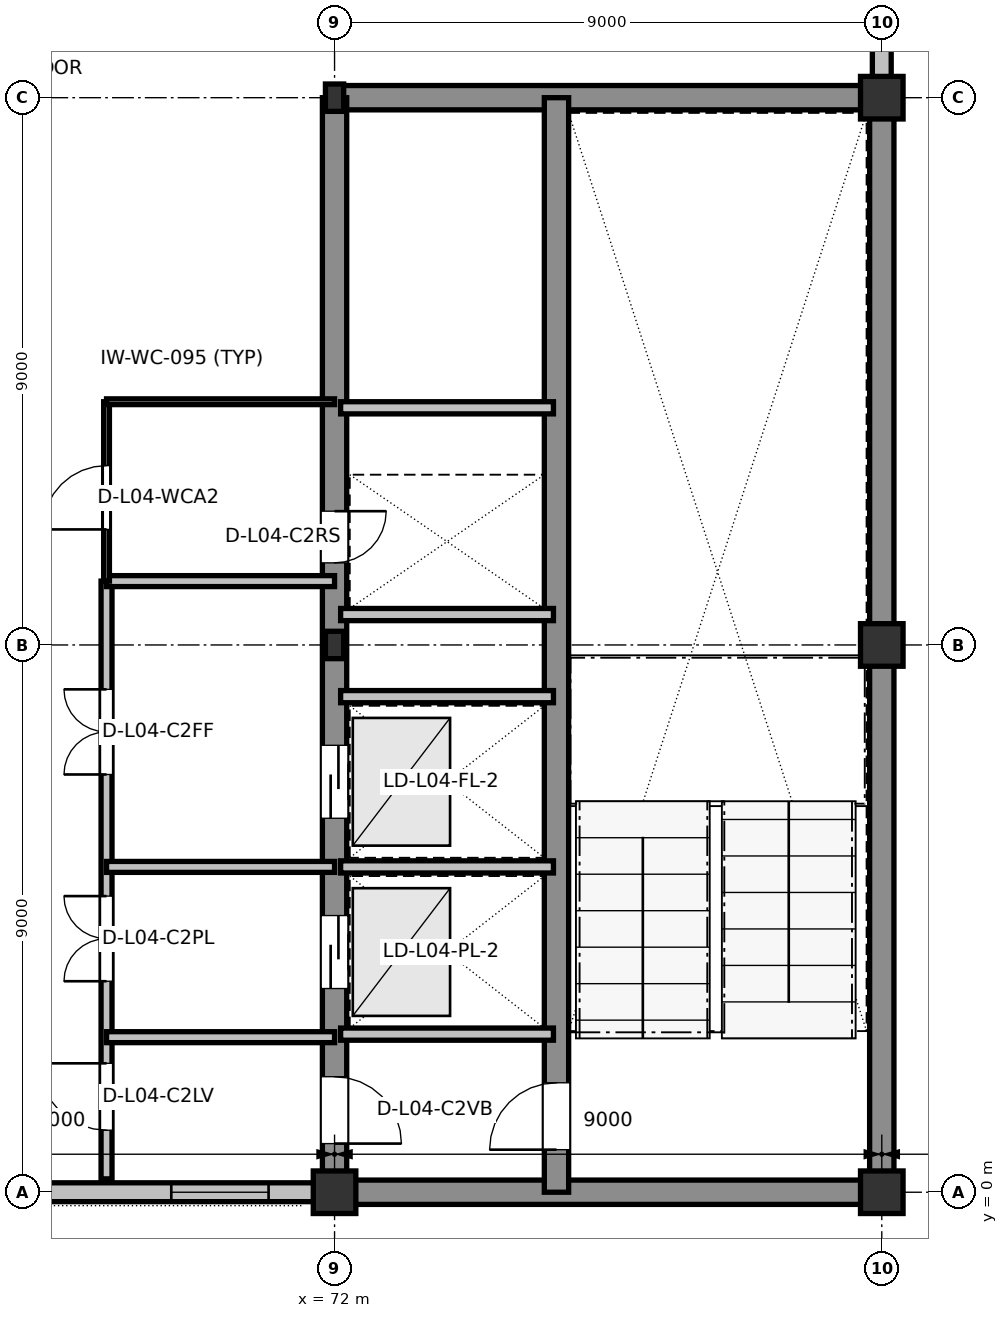
"""IFC4 building model, lengths in metres.
Left out: names, types, materials, properties, quantities, classifications, styles, units other than length and angle.
Written with IfcOpenShell. Run it as: python <this file> out.ifc"""

import sys

from ifc_helpers import new_model, si_unit, direction, frame, frame_2d, origin, origin_2d, place, context, subcontext, project, spatial, rectangle, i_section, extrude, element, fill, save


model = new_model("IFC4")
c1 = context("Model", 3, precision=1e-05, world=origin(), true_north=direction((0.0, 1.0)))
c2 = subcontext(c1, "Body", "Model", "MODEL_VIEW")
j1 = project(units=[si_unit("LENGTHUNIT", "METRE"), si_unit("PLANEANGLEUNIT", "RADIAN")], contexts=[c1])
p1 = place(None, origin())
s1 = spatial("IfcSite", under=j1, at=p1, CompositionType="ELEMENT")
p2 = place(p1, origin())
s2 = spatial("IfcBuilding", under=s1, at=p2, CompositionType="ELEMENT")
p3 = place(p2, frame((0.0, 0.0, 19.2)))
s3 = spatial("IfcBuildingStorey", under=s2, at=p3, CompositionType="ELEMENT", Elevation=19.2)
p4 = place(p3, frame((72.0, 0.0, 0.0), z_axis=(0.0, 0.0, 1.0), x_axis=(1.0, 0.0, 0.0)))
e1 = element("IfcColumn", 1, at=p4, inside=s3, PredefinedType="COLUMN", context=c2, shape_type="SweptSolid", body=[
    extrude(rectangle(XDim=0.7, YDim=0.7, at=origin_2d()), origin(), (0.0, 0.0, 1.0), 4.2),
])
for number, where, z_axis, x_axis in (
    (2, (72.0, 9.0, 0.0), (0.0, 0.0, 1.0), (1.0, 0.0, 0.0)),
    (3, (72.0, 18.0, 0.0), (0.0, 0.0, 1.0), (1.0, 0.0, 0.0)),
):
    element("IfcColumn", number, at=place(p3, frame(where, z_axis=z_axis, x_axis=x_axis)), inside=s3, PredefinedType="COLUMN", context=c2, shape_type="SweptSolid", body=[
        extrude(i_section(OverallWidth=0.3, OverallDepth=0.45, WebThickness=0.014, FlangeThickness=0.026, at=origin_2d()), origin(), (0.0, 0.0, 1.0), 4.2),
    ])
for number, where, z_axis, x_axis in (
    (4, (81.0, 0.0, 0.0), (0.0, 0.0, 1.0), (1.0, 0.0, 0.0)),
    (5, (81.0, 9.0, 0.0), (0.0, 0.0, 1.0), (1.0, 0.0, 0.0)),
    (6, (81.0, 18.0, 0.0), (0.0, 0.0, 1.0), (1.0, 0.0, 0.0)),
):
    element("IfcColumn", number, at=place(p3, frame(where, z_axis=z_axis, x_axis=x_axis)), inside=s3, PredefinedType="COLUMN", context=c2, shape_type="SweptSolid", body=[
        extrude(rectangle(XDim=0.7, YDim=0.7, at=origin_2d()), origin(), (0.0, 0.0, 1.0), 4.2),
    ])
p5 = place(p3, frame((63.335, 0.0, 0.0), z_axis=(0.0, 0.0, 1.0), x_axis=(1.0, 0.0, 0.0)))
e7 = element("IfcWall", 7, at=p5, inside=s3, PredefinedType="STANDARD", context=c2, shape_type="SweptSolid", body=[
    extrude(rectangle(XDim=8.33, YDim=0.31, at=frame_2d((4.165, 0.0))), origin(), (0.0, 0.0, 1.0), 3.635),
])
p6 = place(p5, frame((5.98, 0.0, 0.9)))
e8 = element("IfcOpeningElement", 8, at=p6, cuts=e7, PredefinedType="OPENING", context=c2, shape_type="SweptSolid", body=[
    extrude(rectangle(XDim=1.6, YDim=2.0, at=frame_2d((0.8, 1.0))), frame((0.0, 0.165, 0.0), z_axis=(0.0, -1.0, 0.0), x_axis=(1.0, 0.0, 0.0)), (0.0, 0.0, 1.0), 0.33),
])
p7 = place(p3, frame((81.0, 18.335, 0.0), z_axis=(0.0, 0.0, 1.0), x_axis=(0.0, 1.0, 0.0)))
e9 = element("IfcWall", 9, at=p7, inside=s3, PredefinedType="STANDARD", context=c2, shape_type="SweptSolid", body=[
    extrude(rectangle(XDim=2.74, YDim=0.31, at=frame_2d((1.37, 0.0))), origin(), (0.0, 0.0, 1.0), 3.94),
])
p8 = place(p3, frame((72.0, 0.0, 0.0), z_axis=(0.0, 0.0, 1.0), x_axis=(1.0, 0.0, 0.0)))
e10 = element("IfcWall", 10, at=p8, inside=s3, PredefinedType="SHEAR", context=c2, shape_type="SweptSolid", body=[
    extrude(rectangle(XDim=9.0, YDim=0.4, at=frame_2d((4.5, 0.0))), origin(), (0.0, 0.0, 1.0), 3.96),
])
p9 = place(p3, frame((81.0, 0.0, 0.0), z_axis=(0.0, 0.0, 1.0), x_axis=(0.0, 1.0, 0.0)))
e11 = element("IfcWall", 11, at=p9, inside=s3, PredefinedType="SHEAR", context=c2, shape_type="SweptSolid", body=[
    extrude(rectangle(XDim=18.0, YDim=0.4, at=frame_2d((9.0, 0.0))), origin(), (0.0, 0.0, 1.0), 3.96),
])
p10 = place(p3, frame((81.0, 18.0, 0.0), z_axis=(0.0, 0.0, 1.0), x_axis=(-1.0, 0.0, 0.0)))
e12 = element("IfcWall", 12, at=p10, inside=s3, PredefinedType="SHEAR", context=c2, shape_type="SweptSolid", body=[
    extrude(rectangle(XDim=9.0, YDim=0.4, at=frame_2d((4.5, 0.0))), origin(), (0.0, 0.0, 1.0), 3.96),
])
p11 = place(p3, frame((72.0, 18.0, 0.0), z_axis=(0.0, 0.0, 1.0), x_axis=(0.0, -1.0, 0.0)))
e13 = element("IfcWall", 13, at=p11, inside=s3, PredefinedType="SHEAR", context=c2, shape_type="SweptSolid", body=[
    extrude(rectangle(XDim=18.0, YDim=0.4, at=frame_2d((9.0, 0.0))), origin(), (0.0, 0.0, 1.0), 3.96),
])
p12 = place(p11, frame((16.1, 0.0, 0.0)))
e14 = element("IfcOpeningElement", 14, at=p12, cuts=e13, PredefinedType="OPENING", context=c2, shape_type="SweptSolid", body=[
    extrude(rectangle(XDim=1.1, YDim=2.16, at=frame_2d((0.55, 1.08))), frame((0.0, 0.21, 0.0), z_axis=(0.0, -1.0, 0.0), x_axis=(1.0, 0.0, 0.0)), (0.0, 0.0, 1.0), 0.42),
])
p13 = place(p11, frame((13.45, 0.0, 0.0)))
e15 = element("IfcOpeningElement", 15, at=p13, cuts=e13, PredefinedType="OPENING", context=c2, shape_type="SweptSolid", body=[
    extrude(rectangle(XDim=1.2, YDim=2.2, at=frame_2d((0.6, 1.1))), frame((0.0, 0.21, 0.0), z_axis=(0.0, -1.0, 0.0), x_axis=(1.0, 0.0, 0.0)), (0.0, 0.0, 1.0), 0.42),
])
p14 = place(p11, frame((10.65, 0.0, 0.0)))
e16 = element("IfcOpeningElement", 16, at=p14, cuts=e13, PredefinedType="OPENING", context=c2, shape_type="SweptSolid", body=[
    extrude(rectangle(XDim=1.2, YDim=2.2, at=frame_2d((0.6, 1.1))), frame((0.0, 0.21, 0.0), z_axis=(0.0, -1.0, 0.0), x_axis=(1.0, 0.0, 0.0)), (0.0, 0.0, 1.0), 0.42),
])
p15 = place(p11, frame((6.8, 0.0, 0.0)))
e17 = element("IfcOpeningElement", 17, at=p15, cuts=e13, PredefinedType="OPENING", context=c2, shape_type="SweptSolid", body=[
    extrude(rectangle(XDim=0.85, YDim=2.1, at=frame_2d((0.425, 1.05))), frame((0.0, 0.21, 0.0), z_axis=(0.0, -1.0, 0.0), x_axis=(1.0, 0.0, 0.0)), (0.0, 0.0, 1.0), 0.42),
])
p16 = place(p3, frame((75.65, 0.0, 0.0), z_axis=(0.0, 0.0, 1.0), x_axis=(0.0, 1.0, 0.0)))
e18 = element("IfcWall", 18, at=p16, inside=s3, PredefinedType="SHEAR", context=c2, shape_type="SweptSolid", body=[
    extrude(rectangle(XDim=18.0, YDim=0.4, at=frame_2d((9.0, 0.0))), origin(), (0.0, 0.0, 1.0), 3.96),
])
p17 = place(p16, frame((0.7, 0.0, 0.0)))
e19 = element("IfcOpeningElement", 19, at=p17, cuts=e18, PredefinedType="OPENING", context=c2, shape_type="SweptSolid", body=[
    extrude(rectangle(XDim=1.1, YDim=2.16, at=frame_2d((0.55, 1.08))), frame((0.0, 0.21, 0.0), z_axis=(0.0, -1.0, 0.0), x_axis=(1.0, 0.0, 0.0)), (0.0, 0.0, 1.0), 0.42),
])
for number, where, z_axis, x_axis in (
    (20, (72.1, 2.6, 0.0), (0.0, 0.0, 1.0), (1.0, 0.0, 0.0)),
    (21, (72.1, 5.35, 0.0), (0.0, 0.0, 1.0), (1.0, 0.0, 0.0)),
    (22, (72.1, 8.15, 0.0), (0.0, 0.0, 1.0), (1.0, 0.0, 0.0)),
    (23, (72.1, 9.5, 0.0), (0.0, 0.0, 1.0), (1.0, 0.0, 0.0)),
    (24, (72.1, 12.9, 0.0), (0.0, 0.0, 1.0), (1.0, 0.0, 0.0)),
):
    element("IfcWall", number, at=place(p3, frame(where, z_axis=z_axis, x_axis=x_axis)), inside=s3, PredefinedType="PARTITIONING", context=c2, shape_type="SweptSolid", body=[
        extrude(rectangle(XDim=3.5, YDim=0.2, at=frame_2d((1.75, 0.0))), origin(), (0.0, 0.0, 1.0), 3.96),
    ])
p18 = place(p3, frame((68.25, 0.22, 0.0), z_axis=(0.0, 0.0, 1.0), x_axis=(0.0, 1.0, 0.0)))
e25 = element("IfcWall", 25, at=p18, inside=s3, PredefinedType="PARTITIONING", context=c2, shape_type="SweptSolid", body=[
    extrude(rectangle(XDim=9.83, YDim=0.18, at=frame_2d((4.915, 0.0))), origin(), (0.0, 0.0, 1.0), 3.96),
])
p19 = place(p18, frame((0.8, 0.0, 0.0)))
e26 = element("IfcOpeningElement", 26, at=p19, cuts=e25, PredefinedType="OPENING", context=c2, shape_type="SweptSolid", body=[
    extrude(rectangle(XDim=1.1, YDim=2.16, at=frame_2d((0.55, 1.08))), frame((0.0, 0.1, 0.0), z_axis=(0.0, -1.0, 0.0), x_axis=(1.0, 0.0, 0.0)), (0.0, 0.0, 1.0), 0.2),
])
p20 = place(p18, frame((3.25, 0.0, 0.0)))
e27 = element("IfcOpeningElement", 27, at=p20, cuts=e25, PredefinedType="OPENING", context=c2, shape_type="SweptSolid", body=[
    extrude(rectangle(XDim=1.4, YDim=2.2, at=frame_2d((0.7, 1.1))), frame((0.0, 0.1, 0.0), z_axis=(0.0, -1.0, 0.0), x_axis=(1.0, 0.0, 0.0)), (0.0, 0.0, 1.0), 0.2),
])
p21 = place(p18, frame((6.65, 0.0, 0.0)))
e28 = element("IfcOpeningElement", 28, at=p21, cuts=e25, PredefinedType="OPENING", context=c2, shape_type="SweptSolid", body=[
    extrude(rectangle(XDim=1.4, YDim=2.2, at=frame_2d((0.7, 1.1))), frame((0.0, 0.1, 0.0), z_axis=(0.0, -1.0, 0.0), x_axis=(1.0, 0.0, 0.0)), (0.0, 0.0, 1.0), 0.2),
])
for number, where, z_axis, x_axis in (
    (29, (68.25, 2.55, 0.0), (0.0, 0.0, 1.0), (1.0, 0.0, 0.0)),
    (30, (68.25, 5.35, 0.0), (0.0, 0.0, 1.0), (1.0, 0.0, 0.0)),
    (31, (68.25, 10.05, 0.0), (0.0, 0.0, 1.0), (1.0, 0.0, 0.0)),
):
    element("IfcWall", number, at=place(p3, frame(where, z_axis=z_axis, x_axis=x_axis)), inside=s3, PredefinedType="PARTITIONING", context=c2, shape_type="SweptSolid", body=[
        extrude(rectangle(XDim=3.75, YDim=0.18, at=frame_2d((1.875, 0.0))), origin(), (0.0, 0.0, 1.0), 3.96),
    ])
p22 = place(p3, frame((68.25, 10.05, 0.0), z_axis=(0.0, 0.0, 1.0), x_axis=(0.0, 1.0, 0.0)))
e32 = element("IfcWall", 32, at=p22, inside=s3, PredefinedType="PARTITIONING", context=c2, shape_type="SweptSolid", body=[
    extrude(rectangle(XDim=2.95, YDim=0.095, at=frame_2d((1.475, 0.0))), origin(), (0.0, 0.0, 1.0), 3.96),
])
p23 = place(p22, frame((0.85, 0.0, 0.0)))
e33 = element("IfcOpeningElement", 33, at=p23, cuts=e32, PredefinedType="OPENING", context=c2, shape_type="SweptSolid", body=[
    extrude(rectangle(XDim=1.05, YDim=2.13, at=frame_2d((0.525, 1.065))), frame((0.0, 0.057, 0.0), z_axis=(0.0, -1.0, 0.0), x_axis=(1.0, 0.0, 0.0)), (0.0, 0.0, 1.0), 0.115),
])
p24 = place(p3, frame((68.25, 13.0, 0.0), z_axis=(0.0, 0.0, 1.0), x_axis=(1.0, 0.0, 0.0)))
e34 = element("IfcWall", 34, at=p24, inside=s3, PredefinedType="PARTITIONING", context=c2, shape_type="SweptSolid", body=[
    extrude(rectangle(XDim=3.75, YDim=0.095, at=frame_2d((1.875, 0.0))), origin(), (0.0, 0.0, 1.0), 3.96),
])
p25 = place(p6, origin())
e35 = element("IfcWindow", 35, at=p25, inside=s3, PartitioningType="SINGLE_PANEL", PredefinedType="WINDOW", context=c2, shape_type="SweptSolid", body=[
    extrude(rectangle(XDim=1.6, YDim=2.0, at=frame_2d((0.8, 1.0))), frame((0.0, 0.03, 0.0), z_axis=(0.0, -1.0, 0.0), x_axis=(1.0, 0.0, 0.0)), (0.0, 0.0, 1.0), 0.06),
])
fill(e8, e35)
p26 = place(p17, origin())
e36 = element("IfcDoor", 36, at=p26, inside=s3, OperationType="SINGLE_SWING_LEFT", PredefinedType="DOOR", context=c2, shape_type="SweptSolid", body=[
    extrude(rectangle(XDim=1.1, YDim=2.16, at=frame_2d((0.55, 1.08))), frame((0.0, 0.025, 0.0), z_axis=(0.0, -1.0, 0.0), x_axis=(1.0, 0.0, 0.0)), (0.0, 0.0, 1.0), 0.05),
])
fill(e19, e36)
p27 = place(p12, origin())
e37 = element("IfcDoor", 37, at=p27, inside=s3, OperationType="SINGLE_SWING_RIGHT", PredefinedType="DOOR", context=c2, shape_type="SweptSolid", body=[
    extrude(rectangle(XDim=1.1, YDim=2.16, at=frame_2d((0.55, 1.08))), frame((0.0, 0.025, 0.0), z_axis=(0.0, -1.0, 0.0), x_axis=(1.0, 0.0, 0.0)), (0.0, 0.0, 1.0), 0.05),
])
fill(e14, e37)
p28 = place(p13, origin())
e38 = element("IfcDoor", 38, at=p28, inside=s3, OperationType="SLIDING_TO_LEFT", PredefinedType="DOOR", context=c2, shape_type="SweptSolid", body=[
    extrude(rectangle(XDim=1.2, YDim=2.2, at=frame_2d((0.6, 1.1))), frame((0.0, 0.025, 0.0), z_axis=(0.0, -1.0, 0.0), x_axis=(1.0, 0.0, 0.0)), (0.0, 0.0, 1.0), 0.05),
])
fill(e15, e38)
p29 = place(p14, origin())
e39 = element("IfcDoor", 39, at=p29, inside=s3, OperationType="SLIDING_TO_LEFT", PredefinedType="DOOR", context=c2, shape_type="SweptSolid", body=[
    extrude(rectangle(XDim=1.2, YDim=2.2, at=frame_2d((0.6, 1.1))), frame((0.0, 0.025, 0.0), z_axis=(0.0, -1.0, 0.0), x_axis=(1.0, 0.0, 0.0)), (0.0, 0.0, 1.0), 0.05),
])
fill(e16, e39)
p30 = place(p15, origin())
e40 = element("IfcDoor", 40, at=p30, inside=s3, OperationType="SINGLE_SWING_LEFT", PredefinedType="DOOR", context=c2, shape_type="SweptSolid", body=[
    extrude(rectangle(XDim=0.85, YDim=2.1, at=frame_2d((0.425, 1.05))), frame((0.0, 0.025, 0.0), z_axis=(0.0, -1.0, 0.0), x_axis=(1.0, 0.0, 0.0)), (0.0, 0.0, 1.0), 0.05),
])
fill(e17, e40)
p31 = place(p19, origin())
e41 = element("IfcDoor", 41, at=p31, inside=s3, OperationType="SINGLE_SWING_RIGHT", PredefinedType="DOOR", context=c2, shape_type="SweptSolid", body=[
    extrude(rectangle(XDim=1.1, YDim=2.16, at=frame_2d((0.55, 1.08))), frame((0.0, 0.025, 0.0), z_axis=(0.0, -1.0, 0.0), x_axis=(1.0, 0.0, 0.0)), (0.0, 0.0, 1.0), 0.05),
])
fill(e26, e41)
p32 = place(p20, origin())
e42 = element("IfcDoor", 42, at=p32, inside=s3, OperationType="DOUBLE_DOOR_SINGLE_SWING", PredefinedType="DOOR", context=c2, shape_type="SweptSolid", body=[
    extrude(rectangle(XDim=1.4, YDim=2.2, at=frame_2d((0.7, 1.1))), frame((0.0, 0.025, 0.0), z_axis=(0.0, -1.0, 0.0), x_axis=(1.0, 0.0, 0.0)), (0.0, 0.0, 1.0), 0.05),
])
fill(e27, e42)
p33 = place(p21, origin())
e43 = element("IfcDoor", 43, at=p33, inside=s3, OperationType="DOUBLE_DOOR_SINGLE_SWING", PredefinedType="DOOR", context=c2, shape_type="SweptSolid", body=[
    extrude(rectangle(XDim=1.4, YDim=2.2, at=frame_2d((0.7, 1.1))), frame((0.0, 0.025, 0.0), z_axis=(0.0, -1.0, 0.0), x_axis=(1.0, 0.0, 0.0)), (0.0, 0.0, 1.0), 0.05),
])
fill(e28, e43)
p34 = place(p23, origin())
e44 = element("IfcDoor", 44, at=p34, inside=s3, OperationType="SINGLE_SWING_LEFT", PredefinedType="DOOR", context=c2, shape_type="SweptSolid", body=[
    extrude(rectangle(XDim=1.05, YDim=2.13, at=frame_2d((0.525, 1.065))), frame((0.0, 0.025, 0.0), z_axis=(0.0, -1.0, 0.0), x_axis=(1.0, 0.0, 0.0)), (0.0, 0.0, 1.0), 0.05),
])
fill(e33, e44)
save(model, sys.argv[1])
